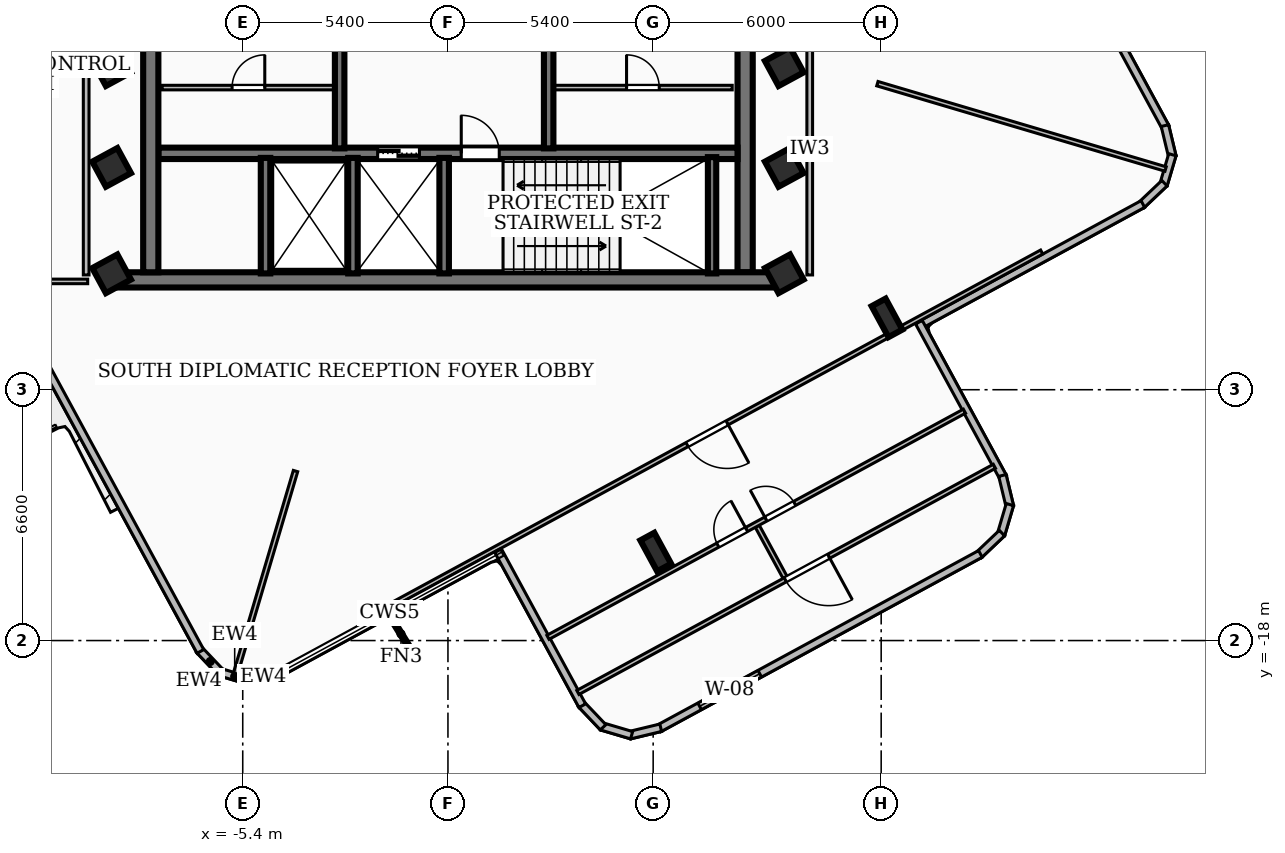
"""IFC4 building model, lengths in metres.
Left out: names, types, materials, properties, quantities, classifications, styles, units other than length and angle.
Written with IfcOpenShell. Run it as: python <this file> out.ifc"""

import sys

from ifc_helpers import new_model, si_unit, direction, frame, frame_2d, origin, origin_2d, place, context, subcontext, project, spatial, rectangle, i_section, extrude, element, fill, save


model = new_model("IFC4")
c1 = context("Model", 3, precision=1e-05, world=origin(), true_north=direction((0.0, 1.0)))
c2 = subcontext(c1, "Body", "Model", "MODEL_VIEW")
j1 = project(units=[si_unit("LENGTHUNIT", "METRE"), si_unit("PLANEANGLEUNIT", "RADIAN")], contexts=[c1])
p1 = place(None, origin())
s1 = spatial("IfcSite", under=j1, at=p1, CompositionType="ELEMENT")
p2 = place(p1, origin())
s2 = spatial("IfcBuilding", under=s1, at=p2, CompositionType="ELEMENT")
p3 = place(p2, frame((0.0, 0.0, 200.88)))
s3 = spatial("IfcBuildingStorey", under=s2, at=p3, CompositionType="ELEMENT", Elevation=200.88)
p4 = place(p3, frame((8.78, -8.51, 0.0), z_axis=(0.0, 0.0, 1.0), x_axis=(-1.0, 0.0, 0.0)))
e1 = element("IfcWall", 1, at=p4, inside=s3, PredefinedType="SHEAR", context=c2, shape_type="SweptSolid", body=[
    extrude(rectangle(XDim=17.56, YDim=0.4, at=frame_2d((8.78, 0.0))), origin(), (0.0, 0.0, 1.0), 4.06),
])
for number, where, z_axis, x_axis in (
    (2, (-7.82, -8.31, 0.0), (0.0, 0.0, 1.0), (0.0, 1.0, 0.0)),
    (3, (7.82, -1.95, 0.0), (0.0, 0.0, 1.0), (0.0, -1.0, 0.0)),
):
    element("IfcWall", number, at=place(p3, frame(where, z_axis=z_axis, x_axis=x_axis)), inside=s3, PredefinedType="SHEAR", context=c2, shape_type="SweptSolid", body=[
        extrude(rectangle(XDim=6.36, YDim=0.4, at=frame_2d((3.18, 0.0))), origin(), (0.0, 0.0, 1.0), 4.06),
    ])
p5 = place(p3, frame((-7.62, -5.18, 0.0), z_axis=(0.0, 0.0, 1.0), x_axis=(1.0, 0.0, 0.0)))
e4 = element("IfcWall", 4, at=p5, inside=s3, PredefinedType="SOLIDWALL", context=c2, shape_type="SweptSolid", body=[
    extrude(rectangle(XDim=15.24, YDim=0.3, at=frame_2d((7.62, 0.0))), origin(), (0.0, 0.0, 1.0), 4.06),
])
p6 = place(p5, frame((5.77, 0.0, 0.0)))
e5 = element("IfcOpeningElement", 5, at=p6, cuts=e4, PredefinedType="OPENING", context=c2, shape_type="SweptSolid", body=[
    extrude(rectangle(XDim=1.1, YDim=2.15, at=frame_2d((0.55, 1.075))), frame((0.0, 0.16, 0.0), z_axis=(0.0, -1.0, 0.0), x_axis=(1.0, 0.0, 0.0)), (0.0, 0.0, 1.0), 0.32),
])
p7 = place(p5, frame((7.97, 0.0, 0.0)))
e6 = element("IfcOpeningElement", 6, at=p7, cuts=e4, PredefinedType="OPENING", context=c2, shape_type="SweptSolid", body=[
    extrude(rectangle(XDim=1.0, YDim=2.1, at=frame_2d((0.5, 1.05))), frame((0.0, 0.16, 0.0), z_axis=(0.0, -1.0, 0.0), x_axis=(1.0, 0.0, 0.0)), (0.0, 0.0, 1.0), 0.32),
])
p8 = place(p3, frame((6.95, -8.34, 0.0), z_axis=(0.0, 0.0, 1.0), x_axis=(0.0, 1.0, 0.0)))
e7 = element("IfcWall", 7, at=p8, inside=s3, PredefinedType="SOLIDWALL", context=c2, shape_type="SweptSolid", body=[
    extrude(rectangle(XDim=3.06, YDim=0.22, at=frame_2d((1.53, 0.0))), origin(), (0.0, 0.0, 1.0), 4.06),
])
for number, where, z_axis, x_axis in (
    (8, (-0.1, -8.34, 0.0), (0.0, 0.0, 1.0), (0.0, 1.0, 0.0)),
    (9, (-2.5, -8.34, 0.0), (0.0, 0.0, 1.0), (0.0, 1.0, 0.0)),
    (10, (-4.8, -8.34, 0.0), (0.0, 0.0, 1.0), (0.0, 1.0, 0.0)),
):
    element("IfcWall", number, at=place(p3, frame(where, z_axis=z_axis, x_axis=x_axis)), inside=s3, PredefinedType="SOLIDWALL", context=c2, shape_type="SweptSolid", body=[
        extrude(rectangle(XDim=3.04, YDim=0.25, at=frame_2d((1.52, 0.0))), origin(), (0.0, 0.0, 1.0), 4.06),
    ])
for number, where, z_axis, x_axis in (
    (11, (-2.85, -5.05, 0.0), (0.0, 0.0, 1.0), (0.0, 1.0, 0.0)),
    (12, (2.65, -5.05, 0.0), (0.0, 0.0, 1.0), (0.0, 1.0, 0.0)),
):
    element("IfcWall", number, at=place(p3, frame(where, z_axis=z_axis, x_axis=x_axis)), inside=s3, PredefinedType="SOLIDWALL", context=c2, shape_type="SweptSolid", body=[
        extrude(rectangle(XDim=3.07, YDim=0.25, at=frame_2d((1.535, 0.0))), origin(), (0.0, 0.0, 1.0), 4.06),
    ])
for number, where, z_axis, x_axis in (
    (13, (-8.85, -5.55, 0.0), (0.0, 0.0, 1.0), (0.879, 0.477, 0.0)),
    (14, (-8.85, -2.9, 0.0), (0.0, 0.0, 1.0), (0.879, 0.477, 0.0)),
    (15, (8.85, -5.55, 0.0), (0.0, 0.0, 1.0), (0.879, 0.477, 0.0)),
    (16, (8.85, -2.9, 0.0), (0.0, 0.0, 1.0), (0.879, 0.477, 0.0)),
    (17, (8.85, -8.35, 0.0), (0.0, 0.0, 1.0), (0.879, 0.477, 0.0)),
    (18, (-8.85, -8.35, 0.0), (0.0, 0.0, 1.0), (0.879, 0.477, 0.0)),
):
    element("IfcColumn", number, at=place(p3, frame(where, z_axis=z_axis, x_axis=x_axis)), inside=s3, PredefinedType="COLUMN", context=c2, shape_type="SweptSolid", body=[
        extrude(rectangle(XDim=0.75, YDim=0.75, at=origin_2d()), origin(), (0.0, 0.0, 1.0), 4.32),
    ])
for number, where, z_axis, x_axis in (
    (19, (5.468, -15.671, 0.0), (0.0, 0.0, 1.0), (0.879, 0.477, 0.0)),
    (20, (11.554, -9.51, 0.0), (0.0, 0.0, 1.0), (0.879, 0.477, 0.0)),
):
    element("IfcColumn", number, at=place(p3, frame(where, z_axis=z_axis, x_axis=x_axis)), inside=s3, PredefinedType="COLUMN", context=c2, shape_type="SweptSolid", body=[
        extrude(i_section(OverallWidth=0.418, OverallDepth=0.927, WebThickness=0.019, FlangeThickness=0.032, at=origin_2d()), origin(), (0.0, 0.0, 1.0), 4.32),
    ])
p9 = place(p3, frame((-4.45, -18.866, 0.0), z_axis=(0.0, 0.0, 1.0), x_axis=(-0.972262900219, -0.233890685703, 0.0)))
e21 = element("IfcWall", 21, at=p9, inside=s3, PredefinedType="SOLIDWALL", context=c2, shape_type="SweptSolid", body=[
    extrude(rectangle(XDim=0.838, YDim=0.2, at=frame_2d((0.419, 0.0))), origin(), (0.0, 0.0, 1.0), 4.06),
])
p10 = place(p3, frame((-5.217, -19.063, 0.0), z_axis=(0.0, 0.0, 1.0), x_axis=(-0.958863850972, 0.283866368736, 0.0)))
e22 = element("IfcWall", 22, at=p10, inside=s3, PredefinedType="SOLIDWALL", context=c2, shape_type="SweptSolid", body=[
    extrude(rectangle(XDim=0.824, YDim=0.2, at=frame_2d((0.412, 0.0))), origin(), (0.0, 0.0, 1.0), 4.06),
])
p11 = place(p3, frame((-5.966, -18.854, 0.0), z_axis=(0.0, 0.0, 1.0), x_axis=(-0.688366566384, 0.725362992084, 0.0)))
e23 = element("IfcWall", 23, at=p11, inside=s3, PredefinedType="SOLIDWALL", context=c2, shape_type="SweptSolid", body=[
    extrude(rectangle(XDim=0.838, YDim=0.2, at=frame_2d((0.419, 0.0))), origin(), (0.0, 0.0, 1.0), 4.06),
])
p12 = place(p3, frame((-6.514, -18.286, 0.0), z_axis=(0.0, 0.0, 1.0), x_axis=(-0.477173953596, 0.878808863183, 0.0)))
e24 = element("IfcWall", 24, at=p12, inside=s3, PredefinedType="SOLIDWALL", context=c2, shape_type="SweptSolid", body=[
    extrude(rectangle(XDim=25.924, YDim=0.2, at=frame_2d((12.962, 0.0))), origin(), (0.0, 0.0, 1.0), 4.06),
])
p13 = place(p12, frame((12.412, 0.0, 0.0)))
e25 = element("IfcOpeningElement", 25, at=p13, cuts=e24, PredefinedType="OPENING", context=c2, shape_type="SweptSolid", body=[
    extrude(rectangle(XDim=1.1, YDim=2.1, at=frame_2d((0.55, 1.05))), frame((0.0, 0.11, 0.0), z_axis=(0.0, -1.0, 0.0), x_axis=(1.0, 0.0, 0.0)), (0.0, 0.0, 1.0), 0.22),
])
p14 = place(p3, frame((15.667, 1.428, 0.0), z_axis=(0.0, 0.0, 1.0), x_axis=(0.477219733162, -0.878784004338, 0.0)))
e26 = element("IfcWall", 26, at=p14, inside=s3, PredefinedType="SOLIDWALL", context=c2, shape_type="SweptSolid", body=[
    extrude(rectangle(XDim=6.741, YDim=0.2, at=frame_2d((3.371, 0.0))), origin(), (0.0, 0.0, 1.0), 4.06),
])
p15 = place(p3, frame((18.866, -4.45, 0.0), z_axis=(0.0, 0.0, 1.0), x_axis=(0.233890685703, -0.972262900219, 0.0)))
e27 = element("IfcWall", 27, at=p15, inside=s3, PredefinedType="SOLIDWALL", context=c2, shape_type="SweptSolid", body=[
    extrude(rectangle(XDim=0.838, YDim=0.2, at=frame_2d((0.419, 0.0))), origin(), (0.0, 0.0, 1.0), 4.06),
])
p16 = place(p3, frame((19.063, -5.217, 0.0), z_axis=(0.0, 0.0, 1.0), x_axis=(-0.283866368736, -0.958863850972, 0.0)))
e28 = element("IfcWall", 28, at=p16, inside=s3, PredefinedType="SOLIDWALL", context=c2, shape_type="SweptSolid", body=[
    extrude(rectangle(XDim=0.824, YDim=0.2, at=frame_2d((0.412, 0.0))), origin(), (0.0, 0.0, 1.0), 4.06),
])
p17 = place(p3, frame((18.854, -5.966, 0.0), z_axis=(0.0, 0.0, 1.0), x_axis=(-0.725362992084, -0.688366566384, 0.0)))
e29 = element("IfcWall", 29, at=p17, inside=s3, PredefinedType="SOLIDWALL", context=c2, shape_type="SweptSolid", body=[
    extrude(rectangle(XDim=0.838, YDim=0.2, at=frame_2d((0.419, 0.0))), origin(), (0.0, 0.0, 1.0), 4.06),
])
p18 = place(p3, frame((18.286, -6.514, 0.0), z_axis=(0.0, 0.0, 1.0), x_axis=(-0.878808744224, -0.477174172682, 0.0)))
e30 = element("IfcWall", 30, at=p18, inside=s3, PredefinedType="SOLIDWALL", context=c2, shape_type="SweptSolid", body=[
    extrude(rectangle(XDim=6.742, YDim=0.2, at=frame_2d((3.371, 0.0))), origin(), (0.0, 0.0, 1.0), 4.06),
])
p19 = place(p3, frame((12.393, -9.623, 0.0), z_axis=(0.0, 0.0, 1.0), x_axis=(0.47719284897, -0.878798603146, 0.0)))
e31 = element("IfcWall", 31, at=p19, inside=s3, PredefinedType="SOLIDWALL", context=c2, shape_type="SweptSolid", body=[
    extrude(rectangle(XDim=4.641, YDim=0.2, at=frame_2d((2.321, 0.0))), origin(), (0.0, 0.0, 1.0), 4.06),
])
p20 = place(p3, frame((14.59, -13.656, 0.0), z_axis=(0.0, 0.0, 1.0), x_axis=(0.233880279999, -0.972265403389, 0.0)))
e32 = element("IfcWall", 32, at=p20, inside=s3, PredefinedType="SOLIDWALL", context=c2, shape_type="SweptSolid", body=[
    extrude(rectangle(XDim=0.837, YDim=0.2, at=frame_2d((0.418, 0.0))), origin(), (0.0, 0.0, 1.0), 4.06),
])
p21 = place(p3, frame((14.787, -14.422, 0.0), z_axis=(0.0, 0.0, 1.0), x_axis=(-0.28389681639, -0.958854836586, 0.0)))
e33 = element("IfcWall", 33, at=p21, inside=s3, PredefinedType="SOLIDWALL", context=c2, shape_type="SweptSolid", body=[
    extrude(rectangle(XDim=0.825, YDim=0.2, at=frame_2d((0.412, 0.0))), origin(), (0.0, 0.0, 1.0), 4.06),
])
p22 = place(p3, frame((14.578, -15.172, 0.0), z_axis=(0.0, 0.0, 1.0), x_axis=(-0.724810143348, -0.688948659988, 0.0)))
e34 = element("IfcWall", 34, at=p22, inside=s3, PredefinedType="SOLIDWALL", context=c2, shape_type="SweptSolid", body=[
    extrude(rectangle(XDim=0.837, YDim=0.2, at=frame_2d((0.419, 0.0))), origin(), (0.0, 0.0, 1.0), 4.06),
])
p23 = place(p3, frame((14.011, -15.72, 0.0), z_axis=(0.0, 0.0, 1.0), x_axis=(-0.878829422659, -0.477136087368, 0.0)))
e35 = element("IfcWall", 35, at=p23, inside=s3, PredefinedType="SOLIDWALL", context=c2, shape_type="SweptSolid", body=[
    extrude(rectangle(XDim=9.624, YDim=0.2, at=frame_2d((4.812, 0.0))), origin(), (0.0, 0.0, 1.0), 4.06),
])
p24 = place(p23, frame((6.607, 0.0, 0.85)))
e36 = element("IfcOpeningElement", 36, at=p24, cuts=e35, PredefinedType="OPENING", context=c2, shape_type="SweptSolid", body=[
    extrude(rectangle(XDim=1.8, YDim=1.8, at=frame_2d((0.9, 0.9))), frame((0.0, 0.11, 0.0), z_axis=(0.0, -1.0, 0.0), x_axis=(1.0, 0.0, 0.0)), (0.0, 0.0, 1.0), 0.22),
])
p25 = place(p3, frame((5.599, -20.294, 0.0), z_axis=(0.0, 0.0, 1.0), x_axis=(-0.972215037407, -0.234089557733, 0.0)))
e37 = element("IfcWall", 37, at=p25, inside=s3, PredefinedType="SOLIDWALL", context=c2, shape_type="SweptSolid", body=[
    extrude(rectangle(XDim=0.837, YDim=0.2, at=frame_2d((0.419, 0.0))), origin(), (0.0, 0.0, 1.0), 4.06),
])
p26 = place(p3, frame((4.833, -20.491, 0.0), z_axis=(0.0, 0.0, 1.0), x_axis=(-0.958959195641, 0.283544107847, 0.0)))
e38 = element("IfcWall", 38, at=p26, inside=s3, PredefinedType="SOLIDWALL", context=c2, shape_type="SweptSolid", body=[
    extrude(rectangle(XDim=0.825, YDim=0.2, at=frame_2d((0.413, 0.0))), origin(), (0.0, 0.0, 1.0), 4.06),
])
p27 = place(p3, frame((4.083, -20.282, 0.0), z_axis=(0.0, 0.0, 1.0), x_axis=(-0.688366566384, 0.725362992084, 0.0)))
e39 = element("IfcWall", 39, at=p27, inside=s3, PredefinedType="SOLIDWALL", context=c2, shape_type="SweptSolid", body=[
    extrude(rectangle(XDim=0.838, YDim=0.2, at=frame_2d((0.419, 0.0))), origin(), (0.0, 0.0, 1.0), 4.06),
])
p28 = place(p3, frame((3.535, -19.714, 0.0), z_axis=(0.0, 0.0, 1.0), x_axis=(-0.477170791431, 0.878810580162, 0.0)))
e40 = element("IfcWall", 40, at=p28, inside=s3, PredefinedType="SOLIDWALL", context=c2, shape_type="SweptSolid", body=[
    extrude(rectangle(XDim=4.642, YDim=0.2, at=frame_2d((2.321, 0.0))), origin(), (0.0, 0.0, 1.0), 4.06),
])
p29 = place(p3, frame((2.8, -3.45, 0.0), z_axis=(0.0, 0.0, 1.0), x_axis=(1.0, 0.0, 0.0)))
e41 = element("IfcWall", 41, at=p29, inside=s3, PredefinedType="PARTITIONING", context=c2, shape_type="SweptSolid", body=[
    extrude(rectangle(XDim=4.68, YDim=0.12, at=frame_2d((2.34, 0.0))), origin(), (0.0, 0.0, 1.0), 4.06),
])
p30 = place(p29, frame((1.9, 0.0, 0.0)))
e42 = element("IfcOpeningElement", 42, at=p30, cuts=e41, PredefinedType="OPENING", context=c2, shape_type="SweptSolid", body=[
    extrude(rectangle(XDim=0.86, YDim=2.04, at=frame_2d((0.43, 1.02))), frame((0.0, 0.07, 0.0), z_axis=(0.0, -1.0, 0.0), x_axis=(1.0, 0.0, 0.0)), (0.0, 0.0, 1.0), 0.14),
])
p31 = place(p3, frame((-7.52, -3.45, 0.0), z_axis=(0.0, 0.0, 1.0), x_axis=(1.0, 0.0, 0.0)))
e43 = element("IfcWall", 43, at=p31, inside=s3, PredefinedType="PARTITIONING", context=c2, shape_type="SweptSolid", body=[
    extrude(rectangle(XDim=4.54, YDim=0.12, at=frame_2d((2.27, 0.0))), origin(), (0.0, 0.0, 1.0), 4.06),
])
p32 = place(p31, frame((1.84, 0.0, 0.0)))
e44 = element("IfcOpeningElement", 44, at=p32, cuts=e43, PredefinedType="OPENING", context=c2, shape_type="SweptSolid", body=[
    extrude(rectangle(XDim=0.86, YDim=2.04, at=frame_2d((0.43, 1.02))), frame((0.0, 0.07, 0.0), z_axis=(0.0, -1.0, 0.0), x_axis=(1.0, 0.0, 0.0)), (0.0, 0.0, 1.0), 0.14),
])
for number, where, z_axis, x_axis in (
    (45, (-9.52, -8.38, 0.0), (0.0, 0.0, 1.0), (0.0, 1.0, 0.0)),
    (46, (9.52, -8.38, 0.0), (0.0, 0.0, 1.0), (0.0, 1.0, 0.0)),
):
    element("IfcWall", number, at=place(p3, frame(where, z_axis=z_axis, x_axis=x_axis)), inside=s3, PredefinedType="PARTITIONING", context=c2, shape_type="SweptSolid", body=[
        extrude(rectangle(XDim=6.63, YDim=0.15, at=frame_2d((3.315, 0.0))), origin(), (0.0, 0.0, 1.0), 4.06),
    ])
p33 = place(p3, frame((-11.726, -8.55, 0.0), z_axis=(0.0, 0.0, 1.0), x_axis=(1.0, 0.0, 0.0)))
e47 = element("IfcWall", 47, at=p33, inside=s3, PredefinedType="PARTITIONING", context=c2, shape_type="SweptSolid", body=[
    extrude(rectangle(XDim=2.246, YDim=0.12, at=frame_2d((1.123, 0.0))), origin(), (0.0, 0.0, 1.0), 4.06),
])
p34 = place(p3, frame((-4.011, -13.54, 0.0), z_axis=(0.0, 0.0, 1.0), x_axis=(-0.283861614282, -0.958865258489, 0.0)))
e48 = element("IfcWall", 48, at=p34, inside=s3, PredefinedType="PARTITIONING", context=c2, shape_type="SweptSolid", body=[
    extrude(rectangle(XDim=5.573, YDim=0.12, at=frame_2d((2.787, 0.0))), origin(), (0.0, 0.0, 1.0), 4.06),
])
p35 = place(p3, frame((11.3, -3.347, 0.0), z_axis=(0.0, 0.0, 1.0), x_axis=(0.958832980981, -0.283970622747, 0.0)))
e49 = element("IfcWall", 49, at=p35, inside=s3, PredefinedType="PARTITIONING", context=c2, shape_type="SweptSolid", body=[
    extrude(rectangle(XDim=7.91, YDim=0.12, at=frame_2d((3.955, 0.0))), origin(), (0.0, 0.0, 1.0), 4.06),
])
p36 = place(p3, frame((15.624, -7.777, 0.0), z_axis=(0.0, 0.0, 1.0), x_axis=(-0.878797236248, -0.477195366242, 0.0)))
e50 = element("IfcWall", 50, at=p36, inside=s3, PredefinedType="PARTITIONING", context=c2, shape_type="SweptSolid", body=[
    extrude(rectangle(XDim=20.04, YDim=0.12, at=frame_2d((10.02, 0.0))), origin(), (0.0, 0.0, 1.0), 3.43),
])
p37 = place(p36, frame((9.419, 0.0, 0.0)))
e51 = element("IfcOpeningElement", 51, at=p37, cuts=e50, PredefinedType="OPENING", context=c2, shape_type="SweptSolid", body=[
    extrude(rectangle(XDim=1.2, YDim=2.1, at=frame_2d((0.6, 1.05))), frame((0.0, 0.07, 0.0), z_axis=(0.0, -1.0, 0.0), x_axis=(1.0, 0.0, 0.0)), (0.0, 0.0, 1.0), 0.14),
])
p38 = place(p3, frame((8.14, -14.993, 0.0), z_axis=(0.0, 0.0, 1.0), x_axis=(0.477408848041, -0.878681279994, 0.0)))
e52 = element("IfcWall", 52, at=p38, inside=s3, PredefinedType="PARTITIONING", context=c2, shape_type="SweptSolid", body=[
    extrude(rectangle(XDim=1.53, YDim=0.12, at=frame_2d((0.765, 0.0))), origin(), (0.0, 0.0, 1.0), 4.06),
])
p39 = place(p3, frame((2.632, -17.915, 0.0), z_axis=(0.0, 0.0, 1.0), x_axis=(0.878826926887, 0.477140684262, 0.0)))
e53 = element("IfcWall", 53, at=p39, inside=s3, PredefinedType="PARTITIONING", context=c2, shape_type="SweptSolid", body=[
    extrude(rectangle(XDim=12.47, YDim=0.12, at=frame_2d((6.235, 0.0))), origin(), (0.0, 0.0, 1.0), 4.06),
])
p40 = place(p39, frame((5.085, 0.0, 0.0)))
e54 = element("IfcOpeningElement", 54, at=p40, cuts=e53, PredefinedType="OPENING", context=c2, shape_type="SweptSolid", body=[
    extrude(rectangle(XDim=0.86, YDim=2.04, at=frame_2d((0.43, 1.02))), frame((0.0, 0.07, 0.0), z_axis=(0.0, -1.0, 0.0), x_axis=(1.0, 0.0, 0.0)), (0.0, 0.0, 1.0), 0.14),
])
p41 = place(p39, frame((6.525, 0.0, 0.0)))
e55 = element("IfcOpeningElement", 55, at=p41, cuts=e53, PredefinedType="OPENING", context=c2, shape_type="SweptSolid", body=[
    extrude(rectangle(XDim=0.86, YDim=2.04, at=frame_2d((0.43, 1.02))), frame((0.0, 0.07, 0.0), z_axis=(0.0, -1.0, 0.0), x_axis=(1.0, 0.0, 0.0)), (0.0, 0.0, 1.0), 0.14),
])
p42 = place(p3, frame((14.379, -13.415, 0.0), z_axis=(0.0, 0.0, 1.0), x_axis=(-0.878844754006, -0.477107847721, 0.0)))
e56 = element("IfcWall", 56, at=p42, inside=s3, PredefinedType="PARTITIONING", context=c2, shape_type="SweptSolid", body=[
    extrude(rectangle(XDim=12.471, YDim=0.12, at=frame_2d((6.235, 0.0))), origin(), (0.0, 0.0, 1.0), 4.06),
])
p43 = place(p42, frame((4.96, 0.0, 0.0)))
e57 = element("IfcOpeningElement", 57, at=p43, cuts=e56, PredefinedType="OPENING", context=c2, shape_type="SweptSolid", body=[
    extrude(rectangle(XDim=1.3, YDim=2.1, at=frame_2d((0.65, 1.05))), frame((0.0, 0.07, 0.0), z_axis=(0.0, -1.0, 0.0), x_axis=(1.0, 0.0, 0.0)), (0.0, 0.0, 1.0), 0.14),
])
p44 = place(p24, origin())
e58 = element("IfcWindow", 58, at=p44, inside=s3, PartitioningType="SINGLE_PANEL", PredefinedType="WINDOW", context=c2, shape_type="SweptSolid", body=[
    extrude(rectangle(XDim=1.8, YDim=1.8, at=frame_2d((0.9, 0.9))), frame((0.0, 0.03, 0.0), z_axis=(0.0, -1.0, 0.0), x_axis=(1.0, 0.0, 0.0)), (0.0, 0.0, 1.0), 0.06),
])
fill(e36, e58)
p45 = place(p6, origin())
e59 = element("IfcDoor", 59, at=p45, inside=s3, OperationType="DOUBLE_DOOR_SLIDING", PredefinedType="DOOR", context=c2, shape_type="SweptSolid", body=[
    extrude(rectangle(XDim=1.1, YDim=2.15, at=frame_2d((0.55, 1.075))), frame((0.0, 0.025, 0.0), z_axis=(0.0, -1.0, 0.0), x_axis=(1.0, 0.0, 0.0)), (0.0, 0.0, 1.0), 0.05),
])
fill(e5, e59)
p46 = place(p7, origin())
e60 = element("IfcDoor", 60, at=p46, inside=s3, OperationType="SINGLE_SWING_LEFT", PredefinedType="DOOR", context=c2, shape_type="SweptSolid", body=[
    extrude(rectangle(XDim=1.0, YDim=2.1, at=frame_2d((0.5, 1.05))), frame((0.0, 0.025, 0.0), z_axis=(0.0, -1.0, 0.0), x_axis=(1.0, 0.0, 0.0)), (0.0, 0.0, 1.0), 0.05),
])
fill(e6, e60)
p47 = place(p30, origin())
e61 = element("IfcDoor", 61, at=p47, inside=s3, OperationType="SINGLE_SWING_LEFT", PredefinedType="DOOR", context=c2, shape_type="SweptSolid", body=[
    extrude(rectangle(XDim=0.86, YDim=2.04, at=frame_2d((0.43, 1.02))), frame((0.0, 0.025, 0.0), z_axis=(0.0, -1.0, 0.0), x_axis=(1.0, 0.0, 0.0)), (0.0, 0.0, 1.0), 0.05),
])
fill(e42, e61)
p48 = place(p32, origin())
e62 = element("IfcDoor", 62, at=p48, inside=s3, OperationType="SINGLE_SWING_RIGHT", PredefinedType="DOOR", context=c2, shape_type="SweptSolid", body=[
    extrude(rectangle(XDim=0.86, YDim=2.04, at=frame_2d((0.43, 1.02))), frame((0.0, 0.025, 0.0), z_axis=(0.0, -1.0, 0.0), x_axis=(1.0, 0.0, 0.0)), (0.0, 0.0, 1.0), 0.05),
])
fill(e44, e62)
p49 = place(p37, origin())
e63 = element("IfcDoor", 63, at=p49, inside=s3, OperationType="SINGLE_SWING_LEFT", PredefinedType="DOOR", context=c2, shape_type="SweptSolid", body=[
    extrude(rectangle(XDim=1.2, YDim=2.1, at=frame_2d((0.6, 1.05))), frame((0.0, 0.025, 0.0), z_axis=(0.0, -1.0, 0.0), x_axis=(1.0, 0.0, 0.0)), (0.0, 0.0, 1.0), 0.05),
])
fill(e51, e63)
p50 = place(p40, origin())
e64 = element("IfcDoor", 64, at=p50, inside=s3, OperationType="SINGLE_SWING_RIGHT", PredefinedType="DOOR", context=c2, shape_type="SweptSolid", body=[
    extrude(rectangle(XDim=0.86, YDim=2.04, at=frame_2d((0.43, 1.02))), frame((0.0, 0.025, 0.0), z_axis=(0.0, -1.0, 0.0), x_axis=(1.0, 0.0, 0.0)), (0.0, 0.0, 1.0), 0.05),
])
fill(e54, e64)
p51 = place(p41, origin())
e65 = element("IfcDoor", 65, at=p51, inside=s3, OperationType="SINGLE_SWING_LEFT", PredefinedType="DOOR", context=c2, shape_type="SweptSolid", body=[
    extrude(rectangle(XDim=0.86, YDim=2.04, at=frame_2d((0.43, 1.02))), frame((0.0, 0.025, 0.0), z_axis=(0.0, -1.0, 0.0), x_axis=(1.0, 0.0, 0.0)), (0.0, 0.0, 1.0), 0.05),
])
fill(e55, e65)
p52 = place(p43, origin())
e66 = element("IfcDoor", 66, at=p52, inside=s3, OperationType="SINGLE_SWING_LEFT", PredefinedType="DOOR", context=c2, shape_type="SweptSolid", body=[
    extrude(rectangle(XDim=1.3, YDim=2.1, at=frame_2d((0.65, 1.05))), frame((0.0, 0.025, 0.0), z_axis=(0.0, -1.0, 0.0), x_axis=(1.0, 0.0, 0.0)), (0.0, 0.0, 1.0), 0.05),
])
fill(e57, e66)
save(model, sys.argv[1])
